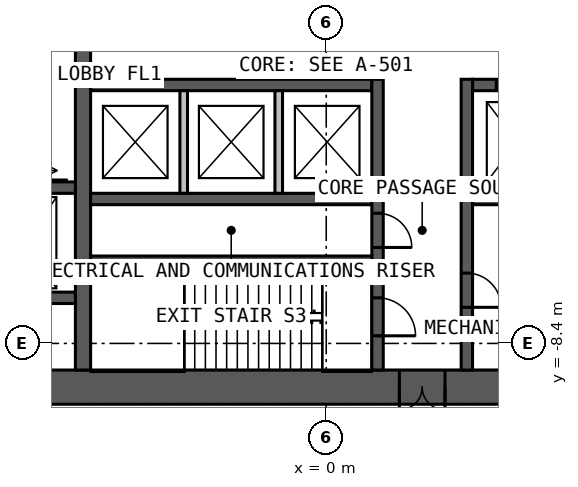
"""IFC4 building model, lengths in metres.
Left out: names, types, materials, properties, quantities, classifications, styles, units other than length and angle.
Written with IfcOpenShell. Run it as: python <this file> out.ifc"""

import sys

from ifc_helpers import new_model, si_unit, direction, frame, frame_2d, origin, place, context, subcontext, project, spatial, rectangle, extrude, element, fill, save


model = new_model("IFC4")
c1 = context("Model", 3, precision=1e-05, world=origin(), true_north=direction((0.0, 1.0)))
c2 = subcontext(c1, "Body", "Model", "MODEL_VIEW")
j1 = project(units=[si_unit("LENGTHUNIT", "METRE"), si_unit("PLANEANGLEUNIT", "RADIAN")], contexts=[c1])
p1 = place(None, origin())
s1 = spatial("IfcSite", under=j1, at=p1, CompositionType="ELEMENT")
p2 = place(p1, origin())
s2 = spatial("IfcBuilding", under=s1, at=p2, CompositionType="ELEMENT")
p3 = place(p2, frame((0.0, 0.0, 6.0)))
s3 = spatial("IfcBuildingStorey", under=s2, at=p3, CompositionType="ELEMENT", Elevation=6.0)
p4 = place(p3, frame((10.0, -9.55, 0.0), z_axis=(0.0, 0.0, 1.0), x_axis=(-1.0, 0.0, 0.0)))
e1 = element("IfcWall", 1, at=p4, inside=s3, PredefinedType="SOLIDWALL", context=c2, shape_type="SweptSolid", body=[
    extrude(rectangle(XDim=20.0, YDim=0.9, at=frame_2d((10.0, 0.0))), origin(), (0.0, 0.0, 1.0), 5.0),
])
p5 = place(p4, frame((6.875, 0.0, 0.0)))
e2 = element("IfcOpeningElement", 2, at=p5, cuts=e1, PredefinedType="OPENING", context=c2, shape_type="SweptSolid", body=[
    extrude(rectangle(XDim=1.2, YDim=2.2, at=frame_2d((0.6, 1.1))), frame((0.0, 0.46, 0.0), z_axis=(0.0, -1.0, 0.0), x_axis=(1.0, 0.0, 0.0)), (0.0, 0.0, 1.0), 0.92),
])
p6 = place(p3, frame((-6.4, -9.1, 0.0), z_axis=(0.0, 0.0, 1.0), x_axis=(0.0, 1.0, 0.0)))
e3 = element("IfcWall", 3, at=p6, inside=s3, PredefinedType="SOLIDWALL", context=c2, shape_type="SweptSolid", body=[
    extrude(rectangle(XDim=18.2, YDim=0.4, at=frame_2d((9.1, 0.0))), origin(), (0.0, 0.0, 1.0), 5.0),
])
p7 = place(p6, frame((8.6, 0.0, 0.0)))
e4 = element("IfcOpeningElement", 4, at=p7, cuts=e3, PredefinedType="OPENING", context=c2, shape_type="SweptSolid", body=[
    extrude(rectangle(XDim=1.0, YDim=2.2, at=frame_2d((0.5, 1.1))), frame((0.0, 0.21, 0.0), z_axis=(0.0, -1.0, 0.0), x_axis=(1.0, 0.0, 0.0)), (0.0, 0.0, 1.0), 0.42),
])
p8 = place(p3, frame((-6.2, -1.6, 0.0), z_axis=(0.0, 0.0, 1.0), x_axis=(1.0, 0.0, 0.0)))
e5 = element("IfcWall", 5, at=p8, inside=s3, PredefinedType="SOLIDWALL", context=c2, shape_type="SweptSolid", body=[
    extrude(rectangle(XDim=7.4, YDim=0.3, at=frame_2d((3.7, 0.0))), origin(), (0.0, 0.0, 1.0), 5.0),
])
p9 = place(p3, frame((3.85, -1.6, 0.0), z_axis=(0.0, 0.0, 1.0), x_axis=(1.0, 0.0, 0.0)))
e6 = element("IfcWall", 6, at=p9, inside=s3, PredefinedType="SOLIDWALL", context=c2, shape_type="SweptSolid", body=[
    extrude(rectangle(XDim=2.35, YDim=0.3, at=frame_2d((1.175, 0.0))), origin(), (0.0, 0.0, 1.0), 5.0),
])
p10 = place(p9, frame((0.625, 0.0, 0.0)))
e7 = element("IfcOpeningElement", 7, at=p10, cuts=e6, PredefinedType="OPENING", context=c2, shape_type="SweptSolid", body=[
    extrude(rectangle(XDim=1.1, YDim=2.2, at=frame_2d((0.55, 1.1))), frame((0.0, 0.16, 0.0), z_axis=(0.0, -1.0, 0.0), x_axis=(1.0, 0.0, 0.0)), (0.0, 0.0, 1.0), 0.32),
])
p11 = place(p3, frame((-6.2, -4.6, 0.0), z_axis=(0.0, 0.0, 1.0), x_axis=(1.0, 0.0, 0.0)))
e8 = element("IfcWall", 8, at=p11, inside=s3, PredefinedType="SOLIDWALL", context=c2, shape_type="SweptSolid", body=[
    extrude(rectangle(XDim=7.4, YDim=0.3, at=frame_2d((3.7, 0.0))), origin(), (0.0, 0.0, 1.0), 5.0),
])
p12 = place(p3, frame((3.85, -4.6, 0.0), z_axis=(0.0, 0.0, 1.0), x_axis=(1.0, 0.0, 0.0)))
e9 = element("IfcWall", 9, at=p12, inside=s3, PredefinedType="SOLIDWALL", context=c2, shape_type="SweptSolid", body=[
    extrude(rectangle(XDim=2.35, YDim=0.3, at=frame_2d((1.175, 0.0))), origin(), (0.0, 0.0, 1.0), 5.0),
])
p13 = place(p3, frame((1.35, -1.45, 0.0), z_axis=(0.0, 0.0, 1.0), x_axis=(0.0, -1.0, 0.0)))
e10 = element("IfcWall", 10, at=p13, inside=s3, PredefinedType="SOLIDWALL", context=c2, shape_type="SweptSolid", body=[
    extrude(rectangle(XDim=7.65, YDim=0.3, at=frame_2d((3.825, 0.0))), origin(), (0.0, 0.0, 1.0), 5.0),
])
p14 = place(p13, frame((5.75, 0.0, 0.0)))
e11 = element("IfcOpeningElement", 11, at=p14, cuts=e10, PredefinedType="OPENING", context=c2, shape_type="SweptSolid", body=[
    extrude(rectangle(XDim=1.0, YDim=2.2, at=frame_2d((0.5, 1.1))), frame((0.0, 0.16, 0.0), z_axis=(0.0, -1.0, 0.0), x_axis=(1.0, 0.0, 0.0)), (0.0, 0.0, 1.0), 0.32),
])
p15 = place(p13, frame((3.525, 0.0, 0.0)))
e12 = element("IfcOpeningElement", 12, at=p15, cuts=e10, PredefinedType="OPENING", context=c2, shape_type="SweptSolid", body=[
    extrude(rectangle(XDim=0.9, YDim=2.2, at=frame_2d((0.45, 1.1))), frame((0.0, 0.16, 0.0), z_axis=(0.0, -1.0, 0.0), x_axis=(1.0, 0.0, 0.0)), (0.0, 0.0, 1.0), 0.32),
])
p16 = place(p3, frame((3.7, -1.45, 0.0), z_axis=(0.0, 0.0, 1.0), x_axis=(0.0, -1.0, 0.0)))
e13 = element("IfcWall", 13, at=p16, inside=s3, PredefinedType="SOLIDWALL", context=c2, shape_type="SweptSolid", body=[
    extrude(rectangle(XDim=7.65, YDim=0.3, at=frame_2d((3.825, 0.0))), origin(), (0.0, 0.0, 1.0), 5.0),
])
p17 = place(p16, frame((5.1, 0.0, 0.0)))
e14 = element("IfcOpeningElement", 14, at=p17, cuts=e13, PredefinedType="OPENING", context=c2, shape_type="SweptSolid", body=[
    extrude(rectangle(XDim=0.9, YDim=2.2, at=frame_2d((0.45, 1.1))), frame((0.0, 0.16, 0.0), z_axis=(0.0, -1.0, 0.0), x_axis=(1.0, 0.0, 0.0)), (0.0, 0.0, 1.0), 0.32),
])
p18 = place(p3, frame((-6.2, -6.2, 0.0), z_axis=(0.0, 0.0, 1.0), x_axis=(1.0, 0.0, 0.0)))
e15 = element("IfcWall", 15, at=p18, inside=s3, PredefinedType="SOLIDWALL", context=c2, shape_type="SweptSolid", body=[
    extrude(rectangle(XDim=7.4, YDim=0.2, at=frame_2d((3.7, 0.0))), origin(), (0.0, 0.0, 1.0), 5.0),
])
p19 = place(p3, frame((-9.1, -4.3, 0.0), z_axis=(0.0, 0.0, 1.0), x_axis=(1.0, 0.0, 0.0)))
e16 = element("IfcWall", 16, at=p19, inside=s3, PredefinedType="SOLIDWALL", context=c2, shape_type="SweptSolid", body=[
    extrude(rectangle(XDim=2.5, YDim=0.3, at=frame_2d((1.25, 0.0))), origin(), (0.0, 0.0, 1.0), 5.0),
])
p20 = place(p19, frame((0.65, 0.0, 0.0)))
e17 = element("IfcOpeningElement", 17, at=p20, cuts=e16, PredefinedType="OPENING", context=c2, shape_type="SweptSolid", body=[
    extrude(rectangle(XDim=1.1, YDim=2.2, at=frame_2d((0.55, 1.1))), frame((0.0, 0.16, 0.0), z_axis=(0.0, -1.0, 0.0), x_axis=(1.0, 0.0, 0.0)), (0.0, 0.0, 1.0), 0.32),
])
p21 = place(p3, frame((-9.1, -7.2, 0.0), z_axis=(0.0, 0.0, 1.0), x_axis=(1.0, 0.0, 0.0)))
e18 = element("IfcWall", 18, at=p21, inside=s3, PredefinedType="SOLIDWALL", context=c2, shape_type="SweptSolid", body=[
    extrude(rectangle(XDim=2.5, YDim=0.3, at=frame_2d((1.25, 0.0))), origin(), (0.0, 0.0, 1.0), 5.0),
])
for number, where, z_axis, x_axis in (
    (19, (-3.75, -1.75, 0.0), (0.0, 0.0, 1.0), (0.0, -1.0, 0.0)),
    (20, (-1.25, -1.75, 0.0), (0.0, 0.0, 1.0), (0.0, -1.0, 0.0)),
):
    element("IfcWall", number, at=place(p3, frame(where, z_axis=z_axis, x_axis=x_axis)), inside=s3, PredefinedType="SOLIDWALL", context=c2, shape_type="SweptSolid", body=[
        extrude(rectangle(XDim=2.7, YDim=0.2, at=frame_2d((1.35, 0.0))), origin(), (0.0, 0.0, 1.0), 4.75),
    ])
p22 = place(p5, origin())
e21 = element("IfcDoor", 21, at=p22, inside=s3, OperationType="DOUBLE_DOOR_SINGLE_SWING", PredefinedType="DOOR", context=c2, shape_type="SweptSolid", body=[
    extrude(rectangle(XDim=1.2, YDim=2.2, at=frame_2d((0.6, 1.1))), frame((0.0, 0.025, 0.0), z_axis=(0.0, -1.0, 0.0), x_axis=(1.0, 0.0, 0.0)), (0.0, 0.0, 1.0), 0.05),
])
fill(e2, e21)
p23 = place(p14, origin())
e22 = element("IfcDoor", 22, at=p23, inside=s3, OperationType="SINGLE_SWING_RIGHT", PredefinedType="DOOR", context=c2, shape_type="SweptSolid", body=[
    extrude(rectangle(XDim=1.0, YDim=2.2, at=frame_2d((0.5, 1.1))), frame((0.0, 0.025, 0.0), z_axis=(0.0, -1.0, 0.0), x_axis=(1.0, 0.0, 0.0)), (0.0, 0.0, 1.0), 0.05),
])
fill(e11, e22)
p24 = place(p15, origin())
e23 = element("IfcDoor", 23, at=p24, inside=s3, OperationType="SINGLE_SWING_RIGHT", PredefinedType="DOOR", context=c2, shape_type="SweptSolid", body=[
    extrude(rectangle(XDim=0.9, YDim=2.2, at=frame_2d((0.45, 1.1))), frame((0.0, 0.025, 0.0), z_axis=(0.0, -1.0, 0.0), x_axis=(1.0, 0.0, 0.0)), (0.0, 0.0, 1.0), 0.05),
])
fill(e12, e23)
p25 = place(p17, origin())
e24 = element("IfcDoor", 24, at=p25, inside=s3, OperationType="SINGLE_SWING_RIGHT", PredefinedType="DOOR", context=c2, shape_type="SweptSolid", body=[
    extrude(rectangle(XDim=0.9, YDim=2.2, at=frame_2d((0.45, 1.1))), frame((0.0, 0.025, 0.0), z_axis=(0.0, -1.0, 0.0), x_axis=(1.0, 0.0, 0.0)), (0.0, 0.0, 1.0), 0.05),
])
fill(e14, e24)
p26 = place(p10, origin())
e25 = element("IfcDoor", 25, at=p26, inside=s3, OperationType="SLIDING_TO_LEFT", PredefinedType="DOOR", context=c2, shape_type="SweptSolid", body=[
    extrude(rectangle(XDim=1.1, YDim=2.2, at=frame_2d((0.55, 1.1))), frame((0.0, 0.025, 0.0), z_axis=(0.0, -1.0, 0.0), x_axis=(1.0, 0.0, 0.0)), (0.0, 0.0, 1.0), 0.05),
])
fill(e7, e25)
save(model, sys.argv[1])
